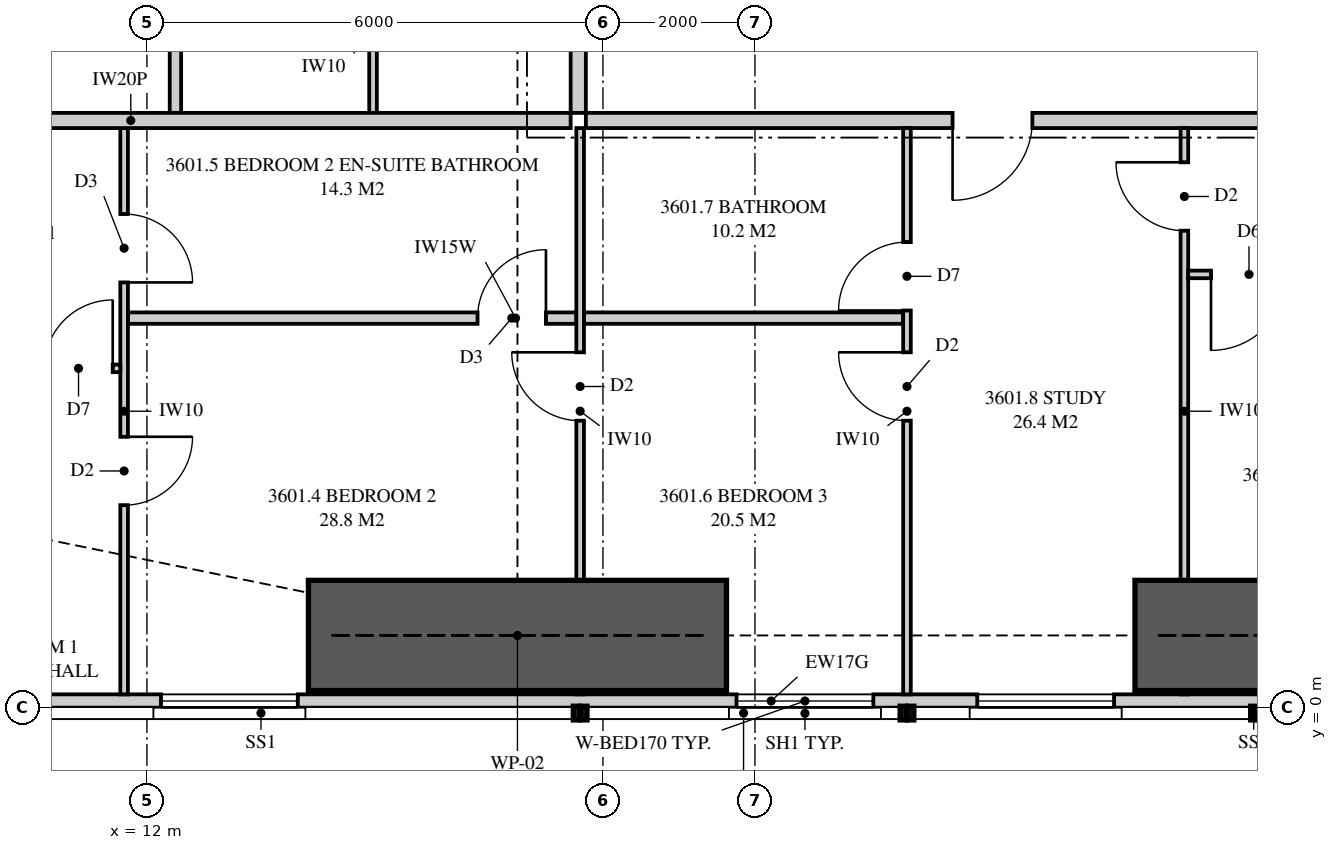
"""IFC4 building model, lengths in metres.
Left out: names, types, materials, properties, quantities, classifications, styles, units other than length and angle.
Written with IfcOpenShell. Run it as: python <this file> out.ifc"""

import sys

from ifc_helpers import new_model, si_unit, direction, frame, frame_2d, origin, place, context, subcontext, project, spatial, polyline, rectangle, outline, extrude, element, fill, save


model = new_model("IFC4")
c1 = context("Model", 3, precision=1e-05, world=origin(), true_north=direction((0.0, 1.0)))
c2 = subcontext(c1, "Body", "Model", "MODEL_VIEW")
j1 = project(units=[si_unit("LENGTHUNIT", "METRE"), si_unit("PLANEANGLEUNIT", "RADIAN")], contexts=[c1])
p1 = place(None, origin())
s1 = spatial("IfcSite", under=j1, at=p1, CompositionType="ELEMENT")
p2 = place(p1, origin())
s2 = spatial("IfcBuilding", under=s1, at=p2, CompositionType="ELEMENT")
p3 = place(p2, frame((0.0, 0.0, 131.65)))
s3 = spatial("IfcBuildingStorey", under=s2, at=p3, CompositionType="ELEMENT", Elevation=131.65)
p4 = place(p3, frame((9.051, 0.087, 0.0), z_axis=(0.0, 0.0, 1.0), x_axis=(1.0, 0.0, 0.0)))
e1 = element("IfcWall", 1, at=p4, inside=s3, PredefinedType="SOLIDWALL", context=c2, shape_type="SweptSolid", body=[
    extrude(outline(polyline([(0.0, 0.0), (22.324, 0.0), (22.324, 2.15), (7.824, 2.15), (7.824, 3.11), (7.666, 3.11), (7.666, 2.15), (7.62, 2.15), (7.62, 3.11), (0.0, 3.11), (0.0, 0.0)])), frame((0.0, 0.087, 0.0), z_axis=(0.0, -1.0, 0.0), x_axis=(1.0, 0.0, 0.0)), (0.0, 0.0, 1.0), 0.175),
])
p5 = place(p4, frame((3.134, 0.0, 0.4)))
e2 = element("IfcOpeningElement", 2, at=p5, cuts=e1, PredefinedType="OPENING", context=c2, shape_type="SweptSolid", body=[
    extrude(rectangle(XDim=1.8, YDim=1.7, at=frame_2d((0.9, 0.85))), frame((0.0, 0.097, 0.0), z_axis=(0.0, -1.0, 0.0), x_axis=(1.0, 0.0, 0.0)), (0.0, 0.0, 1.0), 0.195),
])
p6 = place(p4, frame((10.706, 0.0, 0.4)))
e3 = element("IfcOpeningElement", 3, at=p6, cuts=e1, PredefinedType="OPENING", context=c2, shape_type="SweptSolid", body=[
    extrude(rectangle(XDim=1.8, YDim=1.7, at=frame_2d((0.9, 0.85))), frame((0.0, 0.097, 0.0), z_axis=(0.0, -1.0, 0.0), x_axis=(1.0, 0.0, 0.0)), (0.0, 0.0, 1.0), 0.195),
])
p7 = place(p4, frame((13.874, 0.0, 0.4)))
e4 = element("IfcOpeningElement", 4, at=p7, cuts=e1, PredefinedType="OPENING", context=c2, shape_type="SweptSolid", body=[
    extrude(rectangle(XDim=1.8, YDim=1.7, at=frame_2d((0.9, 0.85))), frame((0.0, 0.097, 0.0), z_axis=(0.0, -1.0, 0.0), x_axis=(1.0, 0.0, 0.0)), (0.0, 0.0, 1.0), 0.195),
])
p8 = place(p3, frame((17.775, 7.725, 0.0), z_axis=(0.0, 0.0, 1.0), x_axis=(1.0, 0.0, 0.0)))
e5 = element("IfcWall", 5, at=p8, inside=s3, PredefinedType="PARTITIONING", context=c2, shape_type="SweptSolid", body=[
    extrude(outline(polyline([(0.0, 0.0), (22.325, 0.0), (22.325, 3.11), (21.187, 3.11), (21.187, 2.541), (20.513, 2.541), (20.513, 3.11), (10.312, 3.11), (10.312, 2.541), (9.638, 2.541), (9.638, 3.11), (0.0, 3.11), (0.0, 0.0)])), frame((0.0, 0.1, 0.0), z_axis=(0.0, -1.0, 0.0), x_axis=(1.0, 0.0, 0.0)), (0.0, 0.0, 1.0), 0.2),
])
p9 = place(p8, frame((4.825, 0.0, 0.0)))
e6 = element("IfcOpeningElement", 6, at=p9, cuts=e5, PredefinedType="OPENING", context=c2, shape_type="SweptSolid", body=[
    extrude(rectangle(XDim=1.05, YDim=2.2, at=frame_2d((0.525, 1.1))), frame((0.0, 0.11, 0.0), z_axis=(0.0, -1.0, 0.0), x_axis=(1.0, 0.0, 0.0)), (0.0, 0.0, 1.0), 0.22),
])
p10 = place(p3, frame((11.7, 0.175, 0.0), z_axis=(0.0, 0.0, 1.0), x_axis=(0.0, 1.0, 0.0)))
e7 = element("IfcWall", 7, at=p10, inside=s3, PredefinedType="PARTITIONING", context=c2, shape_type="SweptSolid", body=[
    extrude(outline(polyline([(0.0, 0.0), (7.45, 0.0), (7.45, 3.11), (2.708, 3.11), (2.708, 2.15), (0.953, 2.15), (0.953, 3.11), (0.0, 3.11), (0.0, 0.0)])), frame((0.0, 0.05, 0.0), z_axis=(0.0, -1.0, 0.0), x_axis=(1.0, 0.0, 0.0)), (0.0, 0.0, 1.0), 0.1),
])
p11 = place(p10, frame((2.489, 0.0, 0.0)))
e8 = element("IfcOpeningElement", 8, at=p11, cuts=e7, PredefinedType="OPENING", context=c2, shape_type="SweptSolid", body=[
    extrude(rectangle(XDim=0.9, YDim=2.1, at=frame_2d((0.45, 1.05))), frame((0.0, 0.06, 0.0), z_axis=(0.0, -1.0, 0.0), x_axis=(1.0, 0.0, 0.0)), (0.0, 0.0, 1.0), 0.12),
])
p12 = place(p10, frame((5.419, 0.0, 0.0)))
e9 = element("IfcOpeningElement", 9, at=p12, cuts=e7, PredefinedType="OPENING", context=c2, shape_type="SweptSolid", body=[
    extrude(rectangle(XDim=0.9, YDim=2.1, at=frame_2d((0.45, 1.05))), frame((0.0, 0.06, 0.0), z_axis=(0.0, -1.0, 0.0), x_axis=(1.0, 0.0, 0.0)), (0.0, 0.0, 1.0), 0.12),
])
p13 = place(p3, frame((17.7, 0.175, 0.0), z_axis=(0.0, 0.0, 1.0), x_axis=(0.0, 1.0, 0.0)))
e10 = element("IfcWall", 10, at=p13, inside=s3, PredefinedType="PARTITIONING", context=c2, shape_type="SweptSolid", body=[
    extrude(outline(polyline([(1.635, 2.15), (0.0, 2.15), (0.0, 0.0), (7.45, 0.0), (7.45, 3.11), (1.635, 3.11), (1.635, 2.15)]), holes=[polyline([(1.021, 0.116), (0.529, 0.116), (0.529, 0.906), (1.021, 0.906), (1.021, 0.116)]), polyline([(1.021, 1.244), (0.529, 1.244), (0.529, 2.034), (1.021, 2.034), (1.021, 1.244)])]), frame((0.0, 0.05, 0.0), z_axis=(0.0, -1.0, 0.0), x_axis=(1.0, 0.0, 0.0)), (0.0, 0.0, 1.0), 0.1),
])
p14 = place(p13, frame((3.6, 0.0, 0.0)))
e11 = element("IfcOpeningElement", 11, at=p14, cuts=e10, PredefinedType="OPENING", context=c2, shape_type="SweptSolid", body=[
    extrude(rectangle(XDim=0.9, YDim=2.1, at=frame_2d((0.45, 1.05))), frame((0.0, 0.06, 0.0), z_axis=(0.0, -1.0, 0.0), x_axis=(1.0, 0.0, 0.0)), (0.0, 0.0, 1.0), 0.12),
])
p15 = place(p3, frame((22.0, 0.175, 0.0), z_axis=(0.0, 0.0, 1.0), x_axis=(0.0, 1.0, 0.0)))
e12 = element("IfcWall", 12, at=p15, inside=s3, PredefinedType="PARTITIONING", context=c2, shape_type="SweptSolid", body=[
    extrude(outline(polyline([(0.0, 0.0), (7.45, 0.0), (7.45, 3.11), (1.635, 3.11), (1.635, 2.15), (0.0, 2.15), (0.0, 3.11), (0.0, 0.0)])), frame((0.0, 0.05, 0.0), z_axis=(0.0, -1.0, 0.0), x_axis=(1.0, 0.0, 0.0)), (0.0, 0.0, 1.0), 0.1),
])
p16 = place(p15, frame((3.6, 0.0, 0.0)))
e13 = element("IfcOpeningElement", 13, at=p16, cuts=e12, PredefinedType="OPENING", context=c2, shape_type="SweptSolid", body=[
    extrude(rectangle(XDim=0.9, YDim=2.1, at=frame_2d((0.45, 1.05))), frame((0.0, 0.06, 0.0), z_axis=(0.0, -1.0, 0.0), x_axis=(1.0, 0.0, 0.0)), (0.0, 0.0, 1.0), 0.12),
])
p17 = place(p15, frame((5.05, 0.0, 0.0)))
e14 = element("IfcOpeningElement", 14, at=p17, cuts=e12, PredefinedType="OPENING", context=c2, shape_type="SweptSolid", body=[
    extrude(rectangle(XDim=0.9, YDim=2.1, at=frame_2d((0.45, 1.05))), frame((0.0, 0.06, 0.0), z_axis=(0.0, -1.0, 0.0), x_axis=(1.0, 0.0, 0.0)), (0.0, 0.0, 1.0), 0.12),
])
p18 = place(p3, frame((6.0, 4.464, 0.0), z_axis=(0.0, 0.0, 1.0), x_axis=(1.0, 0.0, 0.0)))
e15 = element("IfcWall", 15, at=p18, inside=s3, PredefinedType="PARTITIONING", context=c2, shape_type="SweptSolid", body=[
    extrude(outline(polyline([(0.0, 0.0), (5.65, 0.0), (5.65, 3.11), (5.46, 3.11), (5.46, 2.51), (3.206, 2.51), (3.206, 2.15), (1.463, 2.15), (1.463, 3.11), (0.0, 3.11), (0.0, 0.0)])), frame((0.0, 0.05, 0.0), z_axis=(0.0, -1.0, 0.0), x_axis=(1.0, 0.0, 0.0)), (0.0, 0.0, 1.0), 0.1),
])
p19 = place(p18, frame((4.65, 0.0, 0.0)))
e16 = element("IfcOpeningElement", 16, at=p19, cuts=e15, PredefinedType="OPENING", context=c2, shape_type="SweptSolid", body=[
    extrude(rectangle(XDim=0.9, YDim=2.1, at=frame_2d((0.45, 1.05))), frame((0.0, 0.06, 0.0), z_axis=(0.0, -1.0, 0.0), x_axis=(1.0, 0.0, 0.0)), (0.0, 0.0, 1.0), 0.12),
])
p20 = place(p3, frame((11.75, 5.125, 0.0), z_axis=(0.0, 0.0, 1.0), x_axis=(1.0, 0.0, 0.0)))
e17 = element("IfcWall", 17, at=p20, inside=s3, PredefinedType="PLUMBINGWALL", context=c2, shape_type="SweptSolid", body=[
    extrude(outline(polyline([(0.0, 0.0), (5.9, 0.0), (5.9, 3.11), (5.438, 3.11), (5.438, 2.541), (4.812, 2.541), (4.812, 3.11), (0.0, 3.11), (0.0, 0.0)])), frame((0.0, 0.075, 0.0), z_axis=(0.0, -1.0, 0.0), x_axis=(1.0, 0.0, 0.0)), (0.0, 0.0, 1.0), 0.15),
])
p21 = place(p20, frame((4.6, 0.0, 0.0)))
e18 = element("IfcOpeningElement", 18, at=p21, cuts=e17, PredefinedType="OPENING", context=c2, shape_type="SweptSolid", body=[
    extrude(rectangle(XDim=0.9, YDim=2.1, at=frame_2d((0.45, 1.05))), frame((0.0, 0.085, 0.0), z_axis=(0.0, -1.0, 0.0), x_axis=(1.0, 0.0, 0.0)), (0.0, 0.0, 1.0), 0.17),
])
p22 = place(p3, frame((17.75, 5.125, 0.0), z_axis=(0.0, 0.0, 1.0), x_axis=(1.0, 0.0, 0.0)))
e19 = element("IfcWall", 19, at=p22, inside=s3, PredefinedType="PLUMBINGWALL", context=c2, shape_type="SweptSolid", body=[
    extrude(rectangle(XDim=4.2, YDim=0.15, at=frame_2d((2.1, 0.0))), origin(), (0.0, 0.0, 1.0), 3.11),
])
p23 = place(p3, frame((25.65, 0.175, 0.0), z_axis=(0.0, 0.0, 1.0), x_axis=(0.0, 1.0, 0.0)))
e20 = element("IfcWall", 20, at=p23, inside=s3, PredefinedType="PARTITIONING", context=c2, shape_type="SweptSolid", body=[
    extrude(outline(polyline([(0.529, 2.15), (0.0, 2.15), (0.0, 0.0), (0.529, 0.0), (0.529, 0.034), (1.021, 0.034), (1.021, 0.0), (7.45, 0.0), (7.45, 3.11), (1.635, 3.11), (1.635, 2.15), (1.021, 2.15), (1.021, 2.116), (0.529, 2.116), (0.529, 2.15)])), frame((0.0, 0.05, 0.0), z_axis=(0.0, -1.0, 0.0), x_axis=(1.0, 0.0, 0.0)), (0.0, 0.0, 1.0), 0.1),
])
p24 = place(p23, frame((6.1, 0.0, 0.0)))
e21 = element("IfcOpeningElement", 21, at=p24, cuts=e20, PredefinedType="OPENING", context=c2, shape_type="SweptSolid", body=[
    extrude(rectangle(XDim=0.9, YDim=2.1, at=frame_2d((0.45, 1.05))), frame((0.0, 0.06, 0.0), z_axis=(0.0, -1.0, 0.0), x_axis=(1.0, 0.0, 0.0)), (0.0, 0.0, 1.0), 0.12),
])
p25 = place(p3, frame((25.7, 5.7, 0.0), z_axis=(0.0, 0.0, 1.0), x_axis=(1.0, 0.0, 0.0)))
e22 = element("IfcWall", 22, at=p25, inside=s3, PredefinedType="PARTITIONING", context=c2, shape_type="SweptSolid", body=[
    extrude(outline(polyline([(0.0, 0.0), (10.75, 0.0), (10.75, 3.11), (2.337, 3.11), (2.337, 2.541), (1.763, 2.541), (1.763, 3.11), (0.0, 3.11), (0.0, 0.0)])), frame((0.0, 0.05, 0.0), z_axis=(0.0, -1.0, 0.0), x_axis=(1.0, 0.0, 0.0)), (0.0, 0.0, 1.0), 0.1),
])
p26 = place(p25, frame((0.3, 0.0, 0.0)))
e23 = element("IfcOpeningElement", 23, at=p26, cuts=e22, PredefinedType="OPENING", context=c2, shape_type="SweptSolid", body=[
    extrude(rectangle(XDim=1.0, YDim=2.1, at=frame_2d((0.5, 1.05))), frame((0.0, 0.06, 0.0), z_axis=(0.0, -1.0, 0.0), x_axis=(1.0, 0.0, 0.0)), (0.0, 0.0, 1.0), 0.12),
])
p27 = place(p3, frame((6.0, 7.725, 0.0), z_axis=(0.0, 0.0, 1.0), x_axis=(1.0, 0.0, 0.0)))
e24 = element("IfcWall", 24, at=p27, inside=s3, PredefinedType="PARTITIONING", context=c2, shape_type="SweptSolid", body=[
    extrude(outline(polyline([(0.0, 0.0), (11.575, 0.0), (11.575, 3.11), (11.212, 3.11), (11.212, 2.541), (10.538, 2.541), (10.538, 3.11), (5.51, 3.11), (5.51, 2.51), (2.969, 2.51), (2.969, 2.541), (2.727, 2.541), (2.727, 2.15), (0.884, 2.15), (0.884, 3.11), (0.0, 3.11), (0.0, 0.0)])), frame((0.0, 0.1, 0.0), z_axis=(0.0, -1.0, 0.0), x_axis=(1.0, 0.0, 0.0)), (0.0, 0.0, 1.0), 0.2),
])
p28 = place(p3, frame((17.675, 7.825, 0.0), z_axis=(0.0, 0.0, 1.0), x_axis=(0.0, 1.0, 0.0)))
e25 = element("IfcWall", 25, at=p28, inside=s3, PredefinedType="PARTITIONING", context=c2, shape_type="SweptSolid", body=[
    extrude(outline(polyline([(0.0, 0.0), (15.425, 0.0), (15.425, 3.11), (3.087, 3.11), (3.087, 2.541), (2.413, 2.541), (2.413, 3.11), (0.0, 3.11), (0.0, 0.0)])), frame((0.0, 0.1, 0.0), z_axis=(0.0, -1.0, 0.0), x_axis=(1.0, 0.0, 0.0)), (0.0, 0.0, 1.0), 0.2),
])
p29 = place(p28, frame((7.212, 0.0, 0.0)))
e26 = element("IfcOpeningElement", 26, at=p29, cuts=e25, PredefinedType="OPENING", context=c2, shape_type="SweptSolid", body=[
    extrude(rectangle(XDim=1.05, YDim=2.2, at=frame_2d((0.525, 1.1))), frame((0.0, 0.11, 0.0), z_axis=(0.0, -1.0, 0.0), x_axis=(1.0, 0.0, 0.0)), (0.0, 0.0, 1.0), 0.22),
])
p30 = place(p3, frame((12.375, 7.825, 0.0), z_axis=(0.0, 0.0, 1.0), x_axis=(0.0, 1.0, 0.0)))
e27 = element("IfcWall", 27, at=p30, inside=s3, PredefinedType="PLUMBINGWALL", context=c2, shape_type="SweptSolid", body=[
    extrude(outline(polyline([(0.0, 0.0), (3.45, 0.0), (3.45, 3.11), (3.062, 3.11), (3.062, 2.541), (2.438, 2.541), (2.438, 3.11), (0.0, 3.11), (0.0, 0.0)])), frame((0.0, 0.075, 0.0), z_axis=(0.0, -1.0, 0.0), x_axis=(1.0, 0.0, 0.0)), (0.0, 0.0, 1.0), 0.15),
])
p31 = place(p3, frame((14.975, 7.825, 0.0), z_axis=(0.0, 0.0, 1.0), x_axis=(0.0, 1.0, 0.0)))
e28 = element("IfcWall", 28, at=p31, inside=s3, PredefinedType="PARTITIONING", context=c2, shape_type="SweptSolid", body=[
    extrude(outline(polyline([(0.0, 0.0), (3.45, 0.0), (3.45, 3.11), (3.037, 3.11), (3.037, 2.541), (2.463, 2.541), (2.463, 3.11), (0.0, 3.11), (0.0, 0.0)])), frame((0.0, 0.05, 0.0), z_axis=(0.0, -1.0, 0.0), x_axis=(1.0, 0.0, 0.0)), (0.0, 0.0, 1.0), 0.1),
])
for number, where, z_axis, x_axis in (
    (29, (14.125, 0.95, 0.0), (0.0, 0.0, 1.0), (1.0, 0.0, 0.0)),
    (30, (25.0, 0.95, 0.0), (0.0, 0.0, 1.0), (1.0, 0.0, 0.0)),
):
    element("IfcWall", number, at=place(p3, frame(where, z_axis=z_axis, x_axis=x_axis)), inside=s3, PredefinedType="SHEAR", context=c2, shape_type="SweptSolid", body=[
        extrude(rectangle(XDim=5.5, YDim=1.45, at=frame_2d((2.75, 0.0))), origin(), (0.0, 0.0, 1.0), 3.35),
    ])
p32 = place(p5, origin())
e31 = element("IfcWindow", 31, at=p32, inside=s3, PartitioningType="SINGLE_PANEL", PredefinedType="WINDOW", context=c2, shape_type="SweptSolid", body=[
    extrude(rectangle(XDim=1.8, YDim=1.7, at=frame_2d((0.9, 0.85))), frame((0.0, 0.03, 0.0), z_axis=(0.0, -1.0, 0.0), x_axis=(1.0, 0.0, 0.0)), (0.0, 0.0, 1.0), 0.06),
])
fill(e2, e31)
p33 = place(p6, origin())
e32 = element("IfcWindow", 32, at=p33, inside=s3, PartitioningType="SINGLE_PANEL", PredefinedType="WINDOW", context=c2, shape_type="SweptSolid", body=[
    extrude(rectangle(XDim=1.8, YDim=1.7, at=frame_2d((0.9, 0.85))), frame((0.0, 0.03, 0.0), z_axis=(0.0, -1.0, 0.0), x_axis=(1.0, 0.0, 0.0)), (0.0, 0.0, 1.0), 0.06),
])
fill(e3, e32)
p34 = place(p7, origin())
e33 = element("IfcWindow", 33, at=p34, inside=s3, PartitioningType="SINGLE_PANEL", PredefinedType="WINDOW", context=c2, shape_type="SweptSolid", body=[
    extrude(rectangle(XDim=1.8, YDim=1.7, at=frame_2d((0.9, 0.85))), frame((0.0, 0.03, 0.0), z_axis=(0.0, -1.0, 0.0), x_axis=(1.0, 0.0, 0.0)), (0.0, 0.0, 1.0), 0.06),
])
fill(e4, e33)
p35 = place(p9, frame((1.05, 0.0, 0.0), z_axis=(0.0, 0.0, 1.0), x_axis=(-1.0, 0.0, 0.0)))
e34 = element("IfcDoor", 34, at=p35, inside=s3, OperationType="SINGLE_SWING_RIGHT", PredefinedType="DOOR", context=c2, shape_type="SweptSolid", body=[
    extrude(rectangle(XDim=1.05, YDim=2.2, at=frame_2d((0.525, 1.1))), frame((0.0, 0.025, 0.0), z_axis=(0.0, -1.0, 0.0), x_axis=(1.0, 0.0, 0.0)), (0.0, 0.0, 1.0), 0.05),
])
fill(e6, e34)
p36 = place(p19, origin())
e35 = element("IfcDoor", 35, at=p36, inside=s3, OperationType="SINGLE_SWING_RIGHT", PredefinedType="DOOR", context=c2, shape_type="SweptSolid", body=[
    extrude(rectangle(XDim=0.9, YDim=2.1, at=frame_2d((0.45, 1.05))), frame((0.0, 0.025, 0.0), z_axis=(0.0, -1.0, 0.0), x_axis=(1.0, 0.0, 0.0)), (0.0, 0.0, 1.0), 0.05),
])
fill(e16, e35)
p37 = place(p11, frame((0.9, 0.0, 0.0), z_axis=(0.0, 0.0, 1.0), x_axis=(-1.0, 0.0, 0.0)))
e36 = element("IfcDoor", 36, at=p37, inside=s3, OperationType="SINGLE_SWING_LEFT", PredefinedType="DOOR", context=c2, shape_type="SweptSolid", body=[
    extrude(rectangle(XDim=0.9, YDim=2.1, at=frame_2d((0.45, 1.05))), frame((0.0, 0.025, 0.0), z_axis=(0.0, -1.0, 0.0), x_axis=(1.0, 0.0, 0.0)), (0.0, 0.0, 1.0), 0.05),
])
fill(e8, e36)
p38 = place(p14, origin())
e37 = element("IfcDoor", 37, at=p38, inside=s3, OperationType="SINGLE_SWING_RIGHT", PredefinedType="DOOR", context=c2, shape_type="SweptSolid", body=[
    extrude(rectangle(XDim=0.9, YDim=2.1, at=frame_2d((0.45, 1.05))), frame((0.0, 0.025, 0.0), z_axis=(0.0, -1.0, 0.0), x_axis=(1.0, 0.0, 0.0)), (0.0, 0.0, 1.0), 0.05),
])
fill(e11, e37)
p39 = place(p21, origin())
e38 = element("IfcDoor", 38, at=p39, inside=s3, OperationType="SINGLE_SWING_RIGHT", PredefinedType="DOOR", context=c2, shape_type="SweptSolid", body=[
    extrude(rectangle(XDim=0.9, YDim=2.1, at=frame_2d((0.45, 1.05))), frame((0.0, 0.025, 0.0), z_axis=(0.0, -1.0, 0.0), x_axis=(1.0, 0.0, 0.0)), (0.0, 0.0, 1.0), 0.05),
])
fill(e18, e38)
p40 = place(p16, origin())
e39 = element("IfcDoor", 39, at=p40, inside=s3, OperationType="SINGLE_SWING_RIGHT", PredefinedType="DOOR", context=c2, shape_type="SweptSolid", body=[
    extrude(rectangle(XDim=0.9, YDim=2.1, at=frame_2d((0.45, 1.05))), frame((0.0, 0.025, 0.0), z_axis=(0.0, -1.0, 0.0), x_axis=(1.0, 0.0, 0.0)), (0.0, 0.0, 1.0), 0.05),
])
fill(e13, e39)
p41 = place(p17, origin())
e40 = element("IfcDoor", 40, at=p41, inside=s3, OperationType="SINGLE_SWING_LEFT", PredefinedType="DOOR", context=c2, shape_type="SweptSolid", body=[
    extrude(rectangle(XDim=0.9, YDim=2.1, at=frame_2d((0.45, 1.05))), frame((0.0, 0.025, 0.0), z_axis=(0.0, -1.0, 0.0), x_axis=(1.0, 0.0, 0.0)), (0.0, 0.0, 1.0), 0.05),
])
fill(e14, e40)
p42 = place(p12, frame((0.9, 0.0, 0.0), z_axis=(0.0, 0.0, 1.0), x_axis=(-1.0, 0.0, 0.0)))
e41 = element("IfcDoor", 41, at=p42, inside=s3, OperationType="SINGLE_SWING_RIGHT", PredefinedType="DOOR", context=c2, shape_type="SweptSolid", body=[
    extrude(rectangle(XDim=0.9, YDim=2.1, at=frame_2d((0.45, 1.05))), frame((0.0, 0.025, 0.0), z_axis=(0.0, -1.0, 0.0), x_axis=(1.0, 0.0, 0.0)), (0.0, 0.0, 1.0), 0.05),
])
fill(e9, e41)
p43 = place(p24, origin())
e42 = element("IfcDoor", 42, at=p43, inside=s3, OperationType="SINGLE_SWING_RIGHT", PredefinedType="DOOR", context=c2, shape_type="SweptSolid", body=[
    extrude(rectangle(XDim=0.9, YDim=2.1, at=frame_2d((0.45, 1.05))), frame((0.0, 0.025, 0.0), z_axis=(0.0, -1.0, 0.0), x_axis=(1.0, 0.0, 0.0)), (0.0, 0.0, 1.0), 0.05),
])
fill(e21, e42)
p44 = place(p26, frame((1.0, 0.0, 0.0), z_axis=(0.0, 0.0, 1.0), x_axis=(-1.0, 0.0, 0.0)))
e43 = element("IfcDoor", 43, at=p44, inside=s3, OperationType="SINGLE_SWING_RIGHT", PredefinedType="DOOR", context=c2, shape_type="SweptSolid", body=[
    extrude(rectangle(XDim=1.0, YDim=2.1, at=frame_2d((0.5, 1.05))), frame((0.0, 0.025, 0.0), z_axis=(0.0, -1.0, 0.0), x_axis=(1.0, 0.0, 0.0)), (0.0, 0.0, 1.0), 0.05),
])
fill(e23, e43)
save(model, sys.argv[1])
